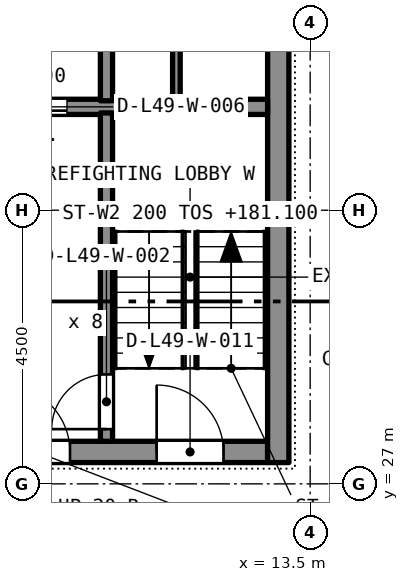
"""IFC4 building model, lengths in metres.
Left out: names, types, materials, properties, quantities, classifications, styles, units other than length and angle.
Written with IfcOpenShell. Run it as: python <this file> out.ifc"""

import sys

from ifc_helpers import new_model, si_unit, direction, frame, frame_2d, origin, place, context, subcontext, project, spatial, rectangle, extrude, element, fill, save


model = new_model("IFC4")
c1 = context("Model", 3, precision=1e-05, world=origin(), true_north=direction((0.0, 1.0)))
c2 = subcontext(c1, "Body", "Model", "MODEL_VIEW")
j1 = project(units=[si_unit("LENGTHUNIT", "METRE"), si_unit("PLANEANGLEUNIT", "RADIAN")], contexts=[c1])
p1 = place(None, origin())
s1 = spatial("IfcSite", under=j1, at=p1, CompositionType="ELEMENT")
p2 = place(p1, origin())
s2 = spatial("IfcBuilding", under=s1, at=p2, CompositionType="ELEMENT")
p3 = place(p2, frame((0.0, 0.0, 179.5)))
s3 = spatial("IfcBuildingStorey", under=s2, at=p3, CompositionType="ELEMENT", Elevation=179.5)
p4 = place(p3, frame((5.2, 27.525, 0.0), z_axis=(0.0, 0.0, 1.0), x_axis=(1.0, 0.0, 0.0)))
e1 = element("IfcWall", 1, at=p4, inside=s3, PredefinedType="SOLIDWALL", context=c2, shape_type="SweptSolid", body=[
    extrude(rectangle(XDim=7.6, YDim=0.35, at=frame_2d((3.8, 0.0))), origin(), (0.0, 0.0, 1.0), 3.2),
])
p5 = place(p4, frame((0.725, 0.0, 0.0)))
e2 = element("IfcOpeningElement", 2, at=p5, cuts=e1, PredefinedType="OPENING", context=c2, shape_type="SweptSolid", body=[
    extrude(rectangle(XDim=1.1, YDim=2.1, at=frame_2d((0.55, 1.05))), frame((0.0, 0.185, 0.0), z_axis=(0.0, -1.0, 0.0), x_axis=(1.0, 0.0, 0.0)), (0.0, 0.0, 1.0), 0.37),
])
p6 = place(p4, frame((3.25, 0.0, 0.0)))
e3 = element("IfcOpeningElement", 3, at=p6, cuts=e1, PredefinedType="OPENING", context=c2, shape_type="SweptSolid", body=[
    extrude(rectangle(XDim=1.1, YDim=2.1, at=frame_2d((0.55, 1.05))), frame((0.0, 0.185, 0.0), z_axis=(0.0, -1.0, 0.0), x_axis=(1.0, 0.0, 0.0)), (0.0, 0.0, 1.0), 0.37),
])
p7 = place(p4, frame((5.775, 0.0, 0.0)))
e4 = element("IfcOpeningElement", 4, at=p7, cuts=e1, PredefinedType="OPENING", context=c2, shape_type="SweptSolid", body=[
    extrude(rectangle(XDim=1.1, YDim=2.1, at=frame_2d((0.55, 1.05))), frame((0.0, 0.185, 0.0), z_axis=(0.0, -1.0, 0.0), x_axis=(1.0, 0.0, 0.0)), (0.0, 0.0, 1.0), 0.37),
])
p8 = place(p3, frame((12.975, 27.35, 0.0), z_axis=(0.0, 0.0, 1.0), x_axis=(0.0, 1.0, 0.0)))
e5 = element("IfcWall", 5, at=p8, inside=s3, PredefinedType="SOLIDWALL", context=c2, shape_type="SweptSolid", body=[
    extrude(rectangle(XDim=12.8, YDim=0.35, at=frame_2d((6.4, 0.0))), origin(), (0.0, 0.0, 1.0), 3.2),
])
p9 = place(p8, frame((10.75, 0.0, 0.0)))
e6 = element("IfcOpeningElement", 6, at=p9, cuts=e5, PredefinedType="OPENING", context=c2, shape_type="SweptSolid", body=[
    extrude(rectangle(XDim=1.1, YDim=2.1, at=frame_2d((0.55, 1.05))), frame((0.0, 0.185, 0.0), z_axis=(0.0, -1.0, 0.0), x_axis=(1.0, 0.0, 0.0)), (0.0, 0.0, 1.0), 0.37),
])
p10 = place(p8, frame((8.6, 0.0, 0.0)))
e7 = element("IfcOpeningElement", 7, at=p10, cuts=e5, PredefinedType="OPENING", context=c2, shape_type="SweptSolid", body=[
    extrude(rectangle(XDim=1.2, YDim=2.1, at=frame_2d((0.6, 1.05))), frame((0.0, 0.185, 0.0), z_axis=(0.0, -1.0, 0.0), x_axis=(1.0, 0.0, 0.0)), (0.0, 0.0, 1.0), 0.37),
])
p11 = place(p3, frame((5.2, 33.2, 0.0), z_axis=(0.0, 0.0, 1.0), x_axis=(1.0, 0.0, 0.0)))
e8 = element("IfcWall", 8, at=p11, inside=s3, PredefinedType="SOLIDWALL", context=c2, shape_type="SweptSolid", body=[
    extrude(rectangle(XDim=7.6, YDim=0.25, at=frame_2d((3.8, 0.0))), origin(), (0.0, 0.0, 1.0), 2.9),
])
p12 = place(p11, frame((3.3, 0.0, 0.0)))
e9 = element("IfcOpeningElement", 9, at=p12, cuts=e8, PredefinedType="OPENING", context=c2, shape_type="SweptSolid", body=[
    extrude(rectangle(XDim=1.0, YDim=2.1, at=frame_2d((0.5, 1.05))), frame((0.0, 0.135, 0.0), z_axis=(0.0, -1.0, 0.0), x_axis=(1.0, 0.0, 0.0)), (0.0, 0.0, 1.0), 0.27),
])
p13 = place(p3, frame((10.15, 27.7, 0.0), z_axis=(0.0, 0.0, 1.0), x_axis=(0.0, 1.0, 0.0)))
e10 = element("IfcWall", 10, at=p13, inside=s3, PredefinedType="SOLIDWALL", context=c2, shape_type="SweptSolid", body=[
    extrude(rectangle(XDim=5.4, YDim=0.2, at=frame_2d((2.7, 0.0))), origin(), (0.0, 0.0, 1.0), 2.9),
])
p14 = place(p13, frame((0.2, 0.0, 0.0)))
e11 = element("IfcOpeningElement", 11, at=p14, cuts=e10, PredefinedType="OPENING", context=c2, shape_type="SweptSolid", body=[
    extrude(rectangle(XDim=0.9, YDim=2.1, at=frame_2d((0.45, 1.05))), frame((0.0, 0.11, 0.0), z_axis=(0.0, -1.0, 0.0), x_axis=(1.0, 0.0, 0.0)), (0.0, 0.0, 1.0), 0.22),
])
p15 = place(p3, frame((10.15, 33.3, 0.0), z_axis=(0.0, 0.0, 1.0), x_axis=(0.0, 1.0, 0.0)))
e12 = element("IfcWall", 12, at=p15, inside=s3, PredefinedType="SOLIDWALL", context=c2, shape_type="SweptSolid", body=[
    extrude(rectangle(XDim=2.3, YDim=0.2, at=frame_2d((1.15, 0.0))), origin(), (0.0, 0.0, 1.0), 2.9),
])
p16 = place(p3, frame((11.3, 33.3, 0.0), z_axis=(0.0, 0.0, 1.0), x_axis=(0.0, 1.0, 0.0)))
e13 = element("IfcWall", 13, at=p16, inside=s3, PredefinedType="PARTITIONING", context=c2, shape_type="SweptSolid", body=[
    extrude(rectangle(XDim=2.3, YDim=0.125, at=frame_2d((1.15, 0.0))), origin(), (0.0, 0.0, 1.0), 2.9),
])
p17 = place(p14, origin())
e14 = element("IfcDoor", 14, at=p17, inside=s3, OperationType="SINGLE_SWING_LEFT", PredefinedType="DOOR", context=c2, shape_type="SweptSolid", body=[
    extrude(rectangle(XDim=0.9, YDim=2.1, at=frame_2d((0.45, 1.05))), frame((0.0, 0.025, 0.0), z_axis=(0.0, -1.0, 0.0), x_axis=(1.0, 0.0, 0.0)), (0.0, 0.0, 1.0), 0.05),
])
fill(e11, e14)
p18 = place(p12, origin())
e15 = element("IfcDoor", 15, at=p18, inside=s3, OperationType="SLIDING_TO_LEFT", PredefinedType="DOOR", context=c2, shape_type="SweptSolid", body=[
    extrude(rectangle(XDim=1.0, YDim=2.1, at=frame_2d((0.5, 1.05))), frame((0.0, 0.025, 0.0), z_axis=(0.0, -1.0, 0.0), x_axis=(1.0, 0.0, 0.0)), (0.0, 0.0, 1.0), 0.05),
])
fill(e9, e15)
p19 = place(p6, origin())
e16 = element("IfcDoor", 16, at=p19, inside=s3, OperationType="SINGLE_SWING_LEFT", PredefinedType="DOOR", context=c2, shape_type="SweptSolid", body=[
    extrude(rectangle(XDim=1.1, YDim=2.1, at=frame_2d((0.55, 1.05))), frame((0.0, 0.025, 0.0), z_axis=(0.0, -1.0, 0.0), x_axis=(1.0, 0.0, 0.0)), (0.0, 0.0, 1.0), 0.05),
])
fill(e3, e16)
p20 = place(p7, origin())
e17 = element("IfcDoor", 17, at=p20, inside=s3, OperationType="SINGLE_SWING_LEFT", PredefinedType="DOOR", context=c2, shape_type="SweptSolid", body=[
    extrude(rectangle(XDim=1.1, YDim=2.1, at=frame_2d((0.55, 1.05))), frame((0.0, 0.025, 0.0), z_axis=(0.0, -1.0, 0.0), x_axis=(1.0, 0.0, 0.0)), (0.0, 0.0, 1.0), 0.05),
])
fill(e4, e17)
save(model, sys.argv[1])
